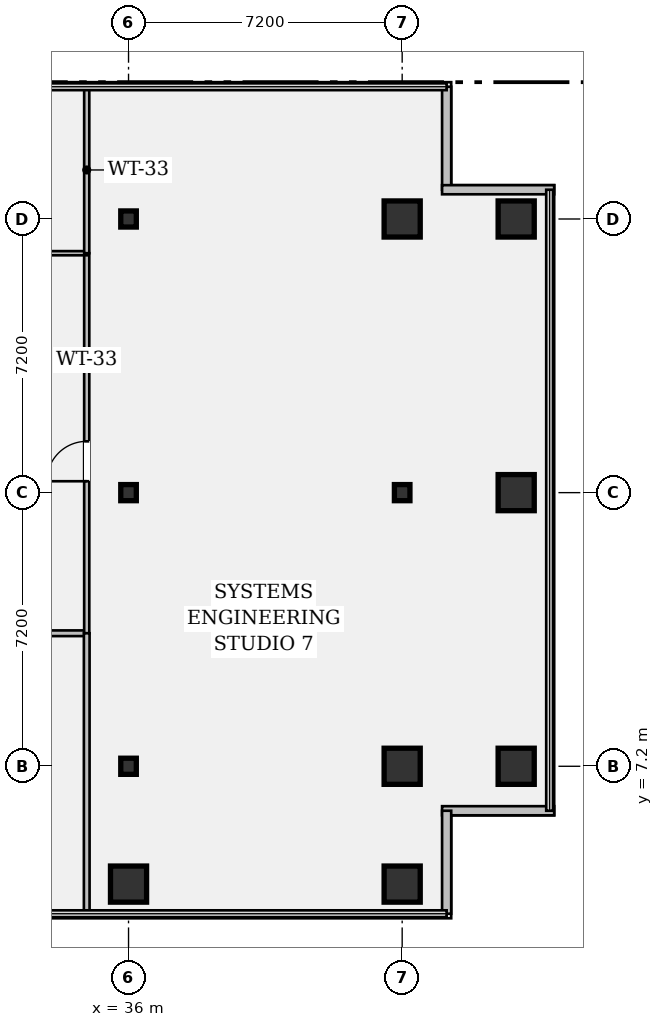
"""IFC4 building model, lengths in metres.
Left out: names, types, materials, properties, quantities, classifications, styles, units other than length and angle.
Written with IfcOpenShell. Run it as: python <this file> out.ifc"""

import sys

from ifc_helpers import new_model, si_unit, direction, frame, frame_2d, origin, origin_2d, place, context, subcontext, project, spatial, rectangle, hollow_rectangle, i_section, extrude, element, fill, save


model = new_model("IFC4")
c1 = context("Model", 3, precision=1e-05, world=origin(), true_north=direction((0.0, 1.0)))
c2 = subcontext(c1, "Body", "Model", "MODEL_VIEW")
j1 = project(units=[si_unit("LENGTHUNIT", "METRE"), si_unit("PLANEANGLEUNIT", "RADIAN")], contexts=[c1])
p1 = place(None, origin())
s1 = spatial("IfcSite", under=j1, at=p1, CompositionType="ELEMENT")
p2 = place(p1, origin())
s2 = spatial("IfcBuilding", under=s1, at=p2, CompositionType="ELEMENT")
p3 = place(p2, frame((0.0, 0.0, 109.9)))
s3 = spatial("IfcBuildingStorey", under=s2, at=p3, CompositionType="ELEMENT", Elevation=109.9)
p4 = place(p3, frame((36.0, 4.1, 0.0), z_axis=(0.0, 0.0, 1.0), x_axis=(1.0, 0.0, 0.0)))
e1 = element("IfcColumn", 1, at=p4, inside=s3, PredefinedType="COLUMN", context=c2, shape_type="SweptSolid", body=[
    extrude(hollow_rectangle(XDim=0.95, YDim=0.95, WallThickness=0.06, at=origin_2d()), origin(), (0.0, 0.0, 1.0), 3.58),
])
for number, where, z_axis, x_axis in (
    (2, (36.0, 7.2, 0.0), (0.0, 0.0, 1.0), (1.0, 0.0, 0.0)),
    (3, (36.0, 14.4, 0.0), (0.0, 0.0, 1.0), (1.0, 0.0, 0.0)),
    (4, (36.0, 21.6, 0.0), (0.0, 0.0, 1.0), (1.0, 0.0, 0.0)),
):
    element("IfcColumn", number, at=place(p3, frame(where, z_axis=z_axis, x_axis=x_axis)), inside=s3, PredefinedType="COLUMN", context=c2, shape_type="SweptSolid", body=[
        extrude(i_section(OverallWidth=0.409, OverallDepth=0.424, WebThickness=0.033, FlangeThickness=0.052, FilletRadius=0.018, at=origin_2d()), origin(), (0.0, 0.0, 1.0), 3.58),
    ])
for number, where, z_axis, x_axis in (
    (5, (43.2, 4.1, 0.0), (0.0, 0.0, 1.0), (1.0, 0.0, 0.0)),
    (6, (43.2, 7.2, 0.0), (0.0, 0.0, 1.0), (1.0, 0.0, 0.0)),
):
    element("IfcColumn", number, at=place(p3, frame(where, z_axis=z_axis, x_axis=x_axis)), inside=s3, PredefinedType="COLUMN", context=c2, shape_type="SweptSolid", body=[
        extrude(hollow_rectangle(XDim=0.95, YDim=0.95, WallThickness=0.06, at=origin_2d()), origin(), (0.0, 0.0, 1.0), 3.58),
    ])
p5 = place(p3, frame((43.2, 14.4, 0.0), z_axis=(0.0, 0.0, 1.0), x_axis=(1.0, 0.0, 0.0)))
e7 = element("IfcColumn", 7, at=p5, inside=s3, PredefinedType="COLUMN", context=c2, shape_type="SweptSolid", body=[
    extrude(i_section(OverallWidth=0.409, OverallDepth=0.424, WebThickness=0.033, FlangeThickness=0.052, FilletRadius=0.018, at=origin_2d()), origin(), (0.0, 0.0, 1.0), 3.58),
])
for number, where, z_axis, x_axis in (
    (8, (43.2, 21.6, 0.0), (0.0, 0.0, 1.0), (1.0, 0.0, 0.0)),
    (9, (46.2, 7.2, 0.0), (0.0, 0.0, 1.0), (1.0, 0.0, 0.0)),
    (10, (46.2, 14.4, 0.0), (0.0, 0.0, 1.0), (1.0, 0.0, 0.0)),
    (11, (46.2, 21.6, 0.0), (0.0, 0.0, 1.0), (1.0, 0.0, 0.0)),
):
    element("IfcColumn", number, at=place(p3, frame(where, z_axis=z_axis, x_axis=x_axis)), inside=s3, PredefinedType="COLUMN", context=c2, shape_type="SweptSolid", body=[
        extrude(hollow_rectangle(XDim=0.95, YDim=0.95, WallThickness=0.06, at=origin_2d()), origin(), (0.0, 0.0, 1.0), 3.58),
    ])
p6 = place(p3, frame((44.37, 25.08, 0.0), z_axis=(0.0, 0.0, 1.0), x_axis=(0.0, -1.0, 0.0)))
e12 = element("IfcWall", 12, at=p6, inside=s3, PredefinedType="STANDARD", context=c2, shape_type="SweptSolid", body=[
    extrude(rectangle(XDim=2.71, YDim=0.24, at=frame_2d((1.355, 0.0))), origin(), (0.0, 0.0, 1.0), 3.58),
])
for number, where, z_axis, x_axis in (
    (13, (44.25, 22.37, 0.0), (0.0, 0.0, 1.0), (1.0, 0.0, 0.0)),
    (14, (47.2, 6.03, 0.0), (0.0, 0.0, 1.0), (-1.0, 0.0, 0.0)),
):
    element("IfcWall", number, at=place(p3, frame(where, z_axis=z_axis, x_axis=x_axis)), inside=s3, PredefinedType="STANDARD", context=c2, shape_type="SweptSolid", body=[
        extrude(rectangle(XDim=2.95, YDim=0.24, at=frame_2d((1.475, 0.0))), origin(), (0.0, 0.0, 1.0), 3.58),
    ])
p7 = place(p3, frame((44.37, 6.03, 0.0), z_axis=(0.0, 0.0, 1.0), x_axis=(0.0, -1.0, 0.0)))
e15 = element("IfcWall", 15, at=p7, inside=s3, PredefinedType="STANDARD", context=c2, shape_type="SweptSolid", body=[
    extrude(rectangle(XDim=2.71, YDim=0.24, at=frame_2d((1.355, 0.0))), origin(), (0.0, 0.0, 1.0), 3.58),
])
p8 = place(p3, frame((17.35, 10.7, 0.0), z_axis=(0.0, 0.0, 1.0), x_axis=(1.0, 0.0, 0.0)))
e16 = element("IfcWall", 16, at=p8, inside=s3, PredefinedType="PARTITIONING", context=c2, shape_type="SweptSolid", body=[
    extrude(rectangle(XDim=17.55, YDim=0.15, at=frame_2d((8.775, 0.0))), origin(), (0.0, 0.0, 1.0), 2.793),
])
p9 = place(p8, frame((2.82, 0.0, 0.0)))
e17 = element("IfcOpeningElement", 17, at=p9, cuts=e16, PredefinedType="OPENING", context=c2, shape_type="SweptSolid", body=[
    extrude(rectangle(XDim=0.92, YDim=2.15, at=frame_2d((0.46, 1.075))), frame((0.0, 0.087, 0.0), z_axis=(0.0, -1.0, 0.0), x_axis=(1.0, 0.0, 0.0)), (0.0, 0.0, 1.0), 0.174),
])
p10 = place(p8, frame((9.45, 0.0, 0.0)))
e18 = element("IfcOpeningElement", 18, at=p10, cuts=e16, PredefinedType="OPENING", context=c2, shape_type="SweptSolid", body=[
    extrude(rectangle(XDim=0.92, YDim=2.15, at=frame_2d((0.46, 1.075))), frame((0.0, 0.087, 0.0), z_axis=(0.0, -1.0, 0.0), x_axis=(1.0, 0.0, 0.0)), (0.0, 0.0, 1.0), 0.174),
])
p11 = place(p8, frame((14.9, 0.0, 0.0)))
e19 = element("IfcOpeningElement", 19, at=p11, cuts=e16, PredefinedType="OPENING", context=c2, shape_type="SweptSolid", body=[
    extrude(rectangle(XDim=0.92, YDim=2.15, at=frame_2d((0.46, 1.075))), frame((0.0, 0.087, 0.0), z_axis=(0.0, -1.0, 0.0), x_axis=(1.0, 0.0, 0.0)), (0.0, 0.0, 1.0), 0.174),
])
p12 = place(p3, frame((34.9, 10.7, 0.0), z_axis=(0.0, 0.0, 1.0), x_axis=(0.0, 1.0, 0.0)))
e20 = element("IfcWall", 20, at=p12, inside=s3, PredefinedType="PARTITIONING", context=c2, shape_type="SweptSolid", body=[
    extrude(rectangle(XDim=10.0, YDim=0.135, at=frame_2d((5.0, 0.0))), origin(), (0.0, 0.0, 1.0), 2.793),
])
p13 = place(p12, frame((4.0, 0.0, 0.0)))
e21 = element("IfcOpeningElement", 21, at=p13, cuts=e20, PredefinedType="OPENING", context=c2, shape_type="SweptSolid", body=[
    extrude(rectangle(XDim=1.05, YDim=2.15, at=frame_2d((0.525, 1.075))), frame((0.0, 0.08, 0.0), z_axis=(0.0, -1.0, 0.0), x_axis=(1.0, 0.0, 0.0)), (0.0, 0.0, 1.0), 0.159),
])
p14 = place(p3, frame((17.35, 20.7, 0.0), z_axis=(0.0, 0.0, 1.0), x_axis=(1.0, 0.0, 0.0)))
e22 = element("IfcWall", 22, at=p14, inside=s3, PredefinedType="PARTITIONING", context=c2, shape_type="SweptSolid", body=[
    extrude(rectangle(XDim=17.55, YDim=0.11, at=frame_2d((8.775, 0.0))), origin(), (0.0, 0.0, 1.0), 2.793),
])
p15 = place(p14, frame((0.85, 0.0, 0.0)))
e23 = element("IfcOpeningElement", 23, at=p15, cuts=e22, PredefinedType="OPENING", context=c2, shape_type="SweptSolid", body=[
    extrude(rectangle(XDim=0.85, YDim=2.15, at=frame_2d((0.425, 1.075))), frame((0.0, 0.067, 0.0), z_axis=(0.0, -1.0, 0.0), x_axis=(1.0, 0.0, 0.0)), (0.0, 0.0, 1.0), 0.134),
])
p16 = place(p14, frame((4.75, 0.0, 0.0)))
e24 = element("IfcOpeningElement", 24, at=p16, cuts=e22, PredefinedType="OPENING", context=c2, shape_type="SweptSolid", body=[
    extrude(rectangle(XDim=0.85, YDim=2.15, at=frame_2d((0.425, 1.075))), frame((0.0, 0.067, 0.0), z_axis=(0.0, -1.0, 0.0), x_axis=(1.0, 0.0, 0.0)), (0.0, 0.0, 1.0), 0.134),
])
p17 = place(p14, frame((6.81, 0.0, 0.0)))
e25 = element("IfcOpeningElement", 25, at=p17, cuts=e22, PredefinedType="OPENING", context=c2, shape_type="SweptSolid", body=[
    extrude(rectangle(XDim=0.85, YDim=2.15, at=frame_2d((0.425, 1.075))), frame((0.0, 0.067, 0.0), z_axis=(0.0, -1.0, 0.0), x_axis=(1.0, 0.0, 0.0)), (0.0, 0.0, 1.0), 0.134),
])
p18 = place(p14, frame((9.21, 0.0, 0.0)))
e26 = element("IfcOpeningElement", 26, at=p18, cuts=e22, PredefinedType="OPENING", context=c2, shape_type="SweptSolid", body=[
    extrude(rectangle(XDim=0.92, YDim=2.15, at=frame_2d((0.46, 1.075))), frame((0.0, 0.067, 0.0), z_axis=(0.0, -1.0, 0.0), x_axis=(1.0, 0.0, 0.0)), (0.0, 0.0, 1.0), 0.134),
])
p19 = place(p3, frame((34.9, 3.32, 0.0), z_axis=(0.0, 0.0, 1.0), x_axis=(0.0, 1.0, 0.0)))
e27 = element("IfcWall", 27, at=p19, inside=s3, PredefinedType="PARTITIONING", context=c2, shape_type="SweptSolid", body=[
    extrude(rectangle(XDim=7.38, YDim=0.15, at=frame_2d((3.69, 0.0))), origin(), (0.0, 0.0, 1.0), 2.793),
])
p20 = place(p3, frame((34.9, 20.7, 0.0), z_axis=(0.0, 0.0, 1.0), x_axis=(0.0, 1.0, 0.0)))
e28 = element("IfcWall", 28, at=p20, inside=s3, PredefinedType="PARTITIONING", context=c2, shape_type="SweptSolid", body=[
    extrude(rectangle(XDim=4.38, YDim=0.135, at=frame_2d((2.19, 0.0))), origin(), (0.0, 0.0, 1.0), 2.793),
])
p21 = place(p13, origin())
e29 = element("IfcDoor", 29, at=p21, inside=s3, OperationType="SINGLE_SWING_LEFT", PredefinedType="DOOR", context=c2, shape_type="SweptSolid", body=[
    extrude(rectangle(XDim=1.05, YDim=2.15, at=frame_2d((0.525, 1.075))), frame((0.0, 0.025, 0.0), z_axis=(0.0, -1.0, 0.0), x_axis=(1.0, 0.0, 0.0)), (0.0, 0.0, 1.0), 0.05),
])
fill(e21, e29)
save(model, sys.argv[1])
